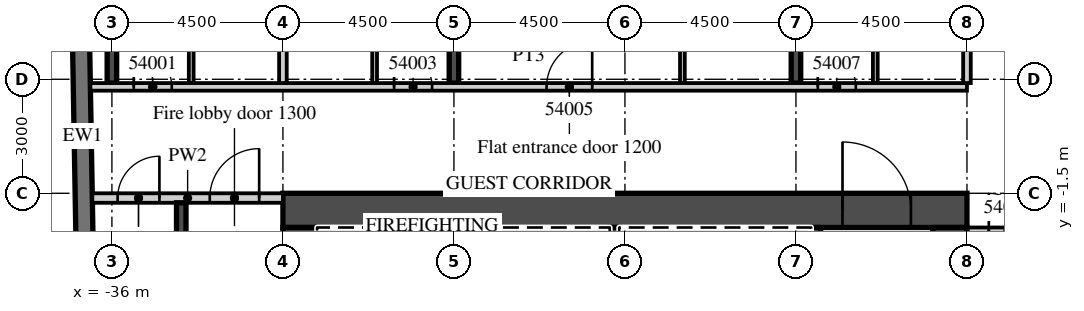
"""IFC4 building model, lengths in metres.
Left out: names, types, materials, properties, quantities, classifications, styles, units other than length and angle.
Written with IfcOpenShell. Run it as: python <this file> out.ifc"""

import sys

from ifc_helpers import new_model, si_unit, direction, frame, frame_2d, origin, place, context, subcontext, project, spatial, rectangle, extrude, element, fill, save


model = new_model("IFC4")
c1 = context("Model", 3, precision=1e-05, world=origin(), true_north=direction((0.0, 1.0)))
c2 = subcontext(c1, "Body", "Model", "MODEL_VIEW")
j1 = project(units=[si_unit("LENGTHUNIT", "METRE"), si_unit("PLANEANGLEUNIT", "RADIAN")], contexts=[c1])
p1 = place(None, origin())
s1 = spatial("IfcSite", under=j1, at=p1, CompositionType="ELEMENT")
p2 = place(p1, origin())
s2 = spatial("IfcBuilding", under=s1, at=p2, CompositionType="ELEMENT")
p3 = place(p2, frame((0.0, 0.0, 224.3)))
s3 = spatial("IfcBuildingStorey", under=s2, at=p3, CompositionType="ELEMENT", Elevation=224.3)
p4 = place(p3, frame((-36.0, 1.4, 0.0), z_axis=(0.0, 0.0, 1.0), x_axis=(0.0, 1.0, 0.0)))
e1 = element("IfcWall", 1, at=p4, inside=s3, PredefinedType="SHEAR", context=c2, shape_type="SweptSolid", body=[
    extrude(rectangle(XDim=17.125, YDim=0.25, at=frame_2d((8.563, 0.0))), origin(), (0.0, 0.0, 1.0), 3.3),
])
p5 = place(p3, frame((-27.0, 1.4, 0.0), z_axis=(0.0, 0.0, 1.0), x_axis=(0.0, 1.0, 0.0)))
e2 = element("IfcWall", 2, at=p5, inside=s3, PredefinedType="SHEAR", context=c2, shape_type="SweptSolid", body=[
    extrude(rectangle(XDim=18.817, YDim=0.25, at=frame_2d((9.409, 0.0))), origin(), (0.0, 0.0, 1.0), 3.3),
])
p6 = place(p3, frame((-18.0, 1.4, 0.0), z_axis=(0.0, 0.0, 1.0), x_axis=(0.0, 1.0, 0.0)))
e3 = element("IfcWall", 3, at=p6, inside=s3, PredefinedType="SHEAR", context=c2, shape_type="SweptSolid", body=[
    extrude(rectangle(XDim=18.974, YDim=0.25, at=frame_2d((9.487, 0.0))), origin(), (0.0, 0.0, 1.0), 3.3),
])
p7 = place(p3, frame((-37.057, 16.503, 0.0), z_axis=(0.0, 0.0, 1.0), x_axis=(0.017452279857, -0.999847697366, 0.0)))
e4 = element("IfcWall", 4, at=p7, inside=s3, PredefinedType="SOLIDWALL", context=c2, shape_type="SweptSolid", body=[
    extrude(rectangle(XDim=33.0, YDim=0.45, at=frame_2d((16.5, 0.0))), origin(), (0.0, 0.0, 1.0), 3.02),
])
p8 = place(p3, frame((-36.566, 1.3, 0.0), z_axis=(0.0, 0.0, 1.0), x_axis=(1.0, 0.0, 0.0)))
e5 = element("IfcWall", 5, at=p8, inside=s3, PredefinedType="PARTITIONING", context=c2, shape_type="SweptSolid", body=[
    extrude(rectangle(XDim=23.066, YDim=0.2, at=frame_2d((11.533, 0.0))), origin(), (0.0, 0.0, 1.0), 3.02),
])
p9 = place(p8, frame((1.141, 0.0, 0.0)))
e6 = element("IfcOpeningElement", 6, at=p9, cuts=e5, PredefinedType="OPENING", context=c2, shape_type="SweptSolid", body=[
    extrude(rectangle(XDim=1.0, YDim=2.1, at=frame_2d((0.5, 1.05))), frame((0.0, 0.11, 0.0), z_axis=(0.0, -1.0, 0.0), x_axis=(1.0, 0.0, 0.0)), (0.0, 0.0, 1.0), 0.22),
])
p10 = place(p8, frame((7.991, 0.0, 0.0)))
e7 = element("IfcOpeningElement", 7, at=p10, cuts=e5, PredefinedType="OPENING", context=c2, shape_type="SweptSolid", body=[
    extrude(rectangle(XDim=1.0, YDim=2.1, at=frame_2d((0.5, 1.05))), frame((0.0, 0.11, 0.0), z_axis=(0.0, -1.0, 0.0), x_axis=(1.0, 0.0, 0.0)), (0.0, 0.0, 1.0), 0.22),
])
p11 = place(p8, frame((12.004, 0.0, 0.0)))
e8 = element("IfcOpeningElement", 8, at=p11, cuts=e5, PredefinedType="OPENING", context=c2, shape_type="SweptSolid", body=[
    extrude(rectangle(XDim=1.2, YDim=2.1, at=frame_2d((0.6, 1.05))), frame((0.0, 0.11, 0.0), z_axis=(0.0, -1.0, 0.0), x_axis=(1.0, 0.0, 0.0)), (0.0, 0.0, 1.0), 0.22),
])
p12 = place(p8, frame((19.141, 0.0, 0.0)))
e9 = element("IfcOpeningElement", 9, at=p12, cuts=e5, PredefinedType="OPENING", context=c2, shape_type="SweptSolid", body=[
    extrude(rectangle(XDim=1.0, YDim=2.1, at=frame_2d((0.5, 1.05))), frame((0.0, 0.11, 0.0), z_axis=(0.0, -1.0, 0.0), x_axis=(1.0, 0.0, 0.0)), (0.0, 0.0, 1.0), 0.22),
])
p13 = place(p3, frame((-31.5, 1.4, 0.0), z_axis=(0.0, 0.0, 1.0), x_axis=(0.0, 1.0, 0.0)))
e10 = element("IfcWall", 10, at=p13, inside=s3, PredefinedType="PARTITIONING", context=c2, shape_type="SweptSolid", body=[
    extrude(rectangle(XDim=18.751, YDim=0.2, at=frame_2d((9.375, 0.0))), origin(), (0.0, 0.0, 1.0), 3.02),
])
p14 = place(p3, frame((-33.913, 1.4, 0.0), z_axis=(0.0, 0.0, 1.0), x_axis=(0.0, 1.0, 0.0)))
e11 = element("IfcWall", 11, at=p14, inside=s3, PredefinedType="PARTITIONING", context=c2, shape_type="SweptSolid", body=[
    extrude(rectangle(XDim=6.725, YDim=0.125, at=frame_2d((3.363, 0.0))), origin(), (0.0, 0.0, 1.0), 3.02),
])
p15 = place(p14, frame((2.45, 0.0, 0.0)))
e12 = element("IfcOpeningElement", 12, at=p15, cuts=e11, PredefinedType="OPENING", context=c2, shape_type="SweptSolid", body=[
    extrude(rectangle(XDim=0.9, YDim=2.1, at=frame_2d((0.45, 1.05))), frame((0.0, 0.073, 0.0), z_axis=(0.0, -1.0, 0.0), x_axis=(1.0, 0.0, 0.0)), (0.0, 0.0, 1.0), 0.145),
])
p16 = place(p3, frame((-29.087, 1.4, 0.0), z_axis=(0.0, 0.0, 1.0), x_axis=(0.0, 1.0, 0.0)))
e13 = element("IfcWall", 13, at=p16, inside=s3, PredefinedType="PARTITIONING", context=c2, shape_type="SweptSolid", body=[
    extrude(rectangle(XDim=6.725, YDim=0.125, at=frame_2d((3.363, 0.0))), origin(), (0.0, 0.0, 1.0), 3.02),
])
p17 = place(p16, frame((2.45, 0.0, 0.0)))
e14 = element("IfcOpeningElement", 14, at=p17, cuts=e13, PredefinedType="OPENING", context=c2, shape_type="SweptSolid", body=[
    extrude(rectangle(XDim=0.9, YDim=2.1, at=frame_2d((0.45, 1.05))), frame((0.0, 0.073, 0.0), z_axis=(0.0, -1.0, 0.0), x_axis=(1.0, 0.0, 0.0)), (0.0, 0.0, 1.0), 0.145),
])
p18 = place(p3, frame((-20.988, 1.4, 0.0), z_axis=(0.0, 0.0, 1.0), x_axis=(0.0, 1.0, 0.0)))
e15 = element("IfcWall", 15, at=p18, inside=s3, PredefinedType="PARTITIONING", context=c2, shape_type="SweptSolid", body=[
    extrude(rectangle(XDim=6.725, YDim=0.125, at=frame_2d((3.363, 0.0))), origin(), (0.0, 0.0, 1.0), 3.02),
])
p19 = place(p18, frame((2.45, 0.0, 0.0)))
e16 = element("IfcOpeningElement", 16, at=p19, cuts=e15, PredefinedType="OPENING", context=c2, shape_type="SweptSolid", body=[
    extrude(rectangle(XDim=0.9, YDim=2.1, at=frame_2d((0.45, 1.05))), frame((0.0, 0.073, 0.0), z_axis=(0.0, -1.0, 0.0), x_axis=(1.0, 0.0, 0.0)), (0.0, 0.0, 1.0), 0.145),
])
p20 = place(p3, frame((-13.5, 1.4, 0.0), z_axis=(0.0, 0.0, 1.0), x_axis=(0.0, 1.0, 0.0)))
e17 = element("IfcWall", 17, at=p20, inside=s3, PredefinedType="PARTITIONING", context=c2, shape_type="SweptSolid", body=[
    extrude(rectangle(XDim=19.065, YDim=0.2, at=frame_2d((9.533, 0.0))), origin(), (0.0, 0.0, 1.0), 3.02),
])
p21 = place(p3, frame((-15.912, 1.4, 0.0), z_axis=(0.0, 0.0, 1.0), x_axis=(0.0, 1.0, 0.0)))
e18 = element("IfcWall", 18, at=p21, inside=s3, PredefinedType="PARTITIONING", context=c2, shape_type="SweptSolid", body=[
    extrude(rectangle(XDim=6.725, YDim=0.125, at=frame_2d((3.363, 0.0))), origin(), (0.0, 0.0, 1.0), 3.02),
])
p22 = place(p21, frame((2.45, 0.0, 0.0)))
e19 = element("IfcOpeningElement", 19, at=p22, cuts=e18, PredefinedType="OPENING", context=c2, shape_type="SweptSolid", body=[
    extrude(rectangle(XDim=0.9, YDim=2.1, at=frame_2d((0.45, 1.05))), frame((0.0, 0.073, 0.0), z_axis=(0.0, -1.0, 0.0), x_axis=(1.0, 0.0, 0.0)), (0.0, 0.0, 1.0), 0.145),
])
p23 = place(p3, frame((-13.5, -2.5, 0.0), z_axis=(0.0, 0.0, 1.0), x_axis=(1.0, 0.0, 0.0)))
e20 = element("IfcWall", 20, at=p23, inside=s3, PredefinedType="PARTITIONING", context=c2, shape_type="SweptSolid", body=[
    extrude(rectangle(XDim=27.0, YDim=0.2, at=frame_2d((13.5, 0.0))), origin(), (0.0, 0.0, 1.0), 3.02),
])
p24 = place(p23, frame((0.575, 0.0, 0.0)))
e21 = element("IfcOpeningElement", 21, at=p24, cuts=e20, PredefinedType="OPENING", context=c2, shape_type="SweptSolid", body=[
    extrude(rectangle(XDim=1.0, YDim=2.1, at=frame_2d((0.5, 1.05))), frame((0.0, 0.11, 0.0), z_axis=(0.0, -1.0, 0.0), x_axis=(1.0, 0.0, 0.0)), (0.0, 0.0, 1.0), 0.22),
])
p25 = place(p23, frame((6.938, 0.0, 0.0)))
e22 = element("IfcOpeningElement", 22, at=p25, cuts=e20, PredefinedType="OPENING", context=c2, shape_type="SweptSolid", body=[
    extrude(rectangle(XDim=1.2, YDim=2.1, at=frame_2d((0.6, 1.05))), frame((0.0, 0.11, 0.0), z_axis=(0.0, -1.0, 0.0), x_axis=(1.0, 0.0, 0.0)), (0.0, 0.0, 1.0), 0.22),
])
p26 = place(p23, frame((15.938, 0.0, 0.0)))
e23 = element("IfcOpeningElement", 23, at=p26, cuts=e20, PredefinedType="OPENING", context=c2, shape_type="SweptSolid", body=[
    extrude(rectangle(XDim=1.2, YDim=2.1, at=frame_2d((0.6, 1.05))), frame((0.0, 0.11, 0.0), z_axis=(0.0, -1.0, 0.0), x_axis=(1.0, 0.0, 0.0)), (0.0, 0.0, 1.0), 0.22),
])
p27 = place(p23, frame((25.425, 0.0, 0.0)))
e24 = element("IfcOpeningElement", 24, at=p27, cuts=e20, PredefinedType="OPENING", context=c2, shape_type="SweptSolid", body=[
    extrude(rectangle(XDim=1.0, YDim=2.1, at=frame_2d((0.5, 1.05))), frame((0.0, 0.11, 0.0), z_axis=(0.0, -1.0, 0.0), x_axis=(1.0, 0.0, 0.0)), (0.0, 0.0, 1.0), 0.22),
])
p28 = place(p3, frame((-31.5, -1.95, 0.0), z_axis=(0.0, 0.0, 1.0), x_axis=(1.0, 0.0, 0.0)))
e25 = element("IfcWall", 25, at=p28, inside=s3, PredefinedType="SHEAR", context=c2, shape_type="SweptSolid", body=[
    extrude(rectangle(XDim=18.0, YDim=0.9, at=frame_2d((9.0, 0.0))), origin(), (0.0, 0.0, 1.0), 3.02),
])
p29 = place(p28, frame((14.725, 0.0, 0.0)))
e26 = element("IfcOpeningElement", 26, at=p29, cuts=e25, PredefinedType="OPENING", context=c2, shape_type="SweptSolid", body=[
    extrude(rectangle(XDim=1.8, YDim=2.1, at=frame_2d((0.9, 1.05))), frame((0.0, 0.46, 0.0), z_axis=(0.0, -1.0, 0.0), x_axis=(1.0, 0.0, 0.0)), (0.0, 0.0, 1.0), 0.92),
])
p30 = place(p3, frame((-31.05, -15.2, 0.0), z_axis=(0.0, 0.0, 1.0), x_axis=(0.0, 1.0, 0.0)))
e27 = element("IfcWall", 27, at=p30, inside=s3, PredefinedType="SHEAR", context=c2, shape_type="SweptSolid", body=[
    extrude(rectangle(XDim=12.8, YDim=0.9, at=frame_2d((6.4, 0.0))), origin(), (0.0, 0.0, 1.0), 3.02),
])
p31 = place(p30, frame((11.5, 0.0, 0.0)))
e28 = element("IfcOpeningElement", 28, at=p31, cuts=e27, PredefinedType="OPENING", context=c2, shape_type="SweptSolid", body=[
    extrude(rectangle(XDim=1.1, YDim=2.1, at=frame_2d((0.55, 1.05))), frame((0.0, 0.46, 0.0), z_axis=(0.0, -1.0, 0.0), x_axis=(1.0, 0.0, 0.0)), (0.0, 0.0, 1.0), 0.92),
])
p32 = place(p3, frame((-13.95, -14.6, 0.0), z_axis=(0.0, 0.0, 1.0), x_axis=(0.0, 1.0, 0.0)))
e29 = element("IfcWall", 29, at=p32, inside=s3, PredefinedType="SHEAR", context=c2, shape_type="SweptSolid", body=[
    extrude(rectangle(XDim=12.2, YDim=0.9, at=frame_2d((6.1, 0.0))), origin(), (0.0, 0.0, 1.0), 3.02),
])
p33 = place(p3, frame((-17.475, -5.55, 0.0), z_axis=(0.0, 0.0, 1.0), x_axis=(0.0, 1.0, 0.0)))
e30 = element("IfcWall", 30, at=p33, inside=s3, PredefinedType="SHEAR", context=c2, shape_type="SweptSolid", body=[
    extrude(rectangle(XDim=3.15, YDim=0.25, at=frame_2d((1.575, 0.0))), origin(), (0.0, 0.0, 1.0), 3.02),
])
for number, where, z_axis, x_axis in (
    (31, (-27.975, -5.3, 0.0), (0.0, 0.0, 1.0), (0.0, 1.0, 0.0)),
    (32, (-22.775, -5.3, 0.0), (0.0, 0.0, 1.0), (0.0, 1.0, 0.0)),
):
    element("IfcWall", number, at=place(p3, frame(where, z_axis=z_axis, x_axis=x_axis)), inside=s3, PredefinedType="SHEAR", context=c2, shape_type="SweptSolid", body=[
        extrude(rectangle(XDim=2.9, YDim=0.25, at=frame_2d((1.45, 0.0))), origin(), (0.0, 0.0, 1.0), 3.02),
    ])
p34 = place(p3, frame((-36.515, -1.625, 0.0), z_axis=(0.0, 0.0, 1.0), x_axis=(1.0, 0.0, 0.0)))
e33 = element("IfcWall", 33, at=p34, inside=s3, PredefinedType="PARTITIONING", context=c2, shape_type="SweptSolid", body=[
    extrude(rectangle(XDim=5.015, YDim=0.25, at=frame_2d((2.508, 0.0))), origin(), (0.0, 0.0, 1.0), 3.02),
])
p35 = place(p34, frame((3.09, 0.0, 0.0)))
e34 = element("IfcOpeningElement", 34, at=p35, cuts=e33, PredefinedType="OPENING", context=c2, shape_type="SweptSolid", body=[
    extrude(rectangle(XDim=1.3, YDim=2.1, at=frame_2d((0.65, 1.05))), frame((0.0, 0.135, 0.0), z_axis=(0.0, -1.0, 0.0), x_axis=(1.0, 0.0, 0.0)), (0.0, 0.0, 1.0), 0.27),
])
p36 = place(p34, frame((0.665, 0.0, 0.0)))
e35 = element("IfcOpeningElement", 35, at=p36, cuts=e33, PredefinedType="OPENING", context=c2, shape_type="SweptSolid", body=[
    extrude(rectangle(XDim=1.1, YDim=2.1, at=frame_2d((0.55, 1.05))), frame((0.0, 0.135, 0.0), z_axis=(0.0, -1.0, 0.0), x_axis=(1.0, 0.0, 0.0)), (0.0, 0.0, 1.0), 0.27),
])
p37 = place(p3, frame((-34.175, -10.1, 0.0), z_axis=(0.0, 0.0, 1.0), x_axis=(0.0, 1.0, 0.0)))
e36 = element("IfcWall", 36, at=p37, inside=s3, PredefinedType="SHEAR", context=c2, shape_type="SweptSolid", body=[
    extrude(rectangle(XDim=8.35, YDim=0.25, at=frame_2d((4.175, 0.0))), origin(), (0.0, 0.0, 1.0), 3.02),
])
p38 = place(p9, origin())
e37 = element("IfcDoor", 37, at=p38, inside=s3, OperationType="SINGLE_SWING_LEFT", PredefinedType="DOOR", context=c2, shape_type="SweptSolid", body=[
    extrude(rectangle(XDim=1.0, YDim=2.1, at=frame_2d((0.5, 1.05))), frame((0.0, 0.025, 0.0), z_axis=(0.0, -1.0, 0.0), x_axis=(1.0, 0.0, 0.0)), (0.0, 0.0, 1.0), 0.05),
])
fill(e6, e37)
p39 = place(p10, origin())
e38 = element("IfcDoor", 38, at=p39, inside=s3, OperationType="SINGLE_SWING_LEFT", PredefinedType="DOOR", context=c2, shape_type="SweptSolid", body=[
    extrude(rectangle(XDim=1.0, YDim=2.1, at=frame_2d((0.5, 1.05))), frame((0.0, 0.025, 0.0), z_axis=(0.0, -1.0, 0.0), x_axis=(1.0, 0.0, 0.0)), (0.0, 0.0, 1.0), 0.05),
])
fill(e7, e38)
p40 = place(p11, origin())
e39 = element("IfcDoor", 39, at=p40, inside=s3, OperationType="SINGLE_SWING_RIGHT", PredefinedType="DOOR", context=c2, shape_type="SweptSolid", body=[
    extrude(rectangle(XDim=1.2, YDim=2.1, at=frame_2d((0.6, 1.05))), frame((0.0, 0.025, 0.0), z_axis=(0.0, -1.0, 0.0), x_axis=(1.0, 0.0, 0.0)), (0.0, 0.0, 1.0), 0.05),
])
fill(e8, e39)
p41 = place(p12, origin())
e40 = element("IfcDoor", 40, at=p41, inside=s3, OperationType="SINGLE_SWING_LEFT", PredefinedType="DOOR", context=c2, shape_type="SweptSolid", body=[
    extrude(rectangle(XDim=1.0, YDim=2.1, at=frame_2d((0.5, 1.05))), frame((0.0, 0.025, 0.0), z_axis=(0.0, -1.0, 0.0), x_axis=(1.0, 0.0, 0.0)), (0.0, 0.0, 1.0), 0.05),
])
fill(e9, e40)
p42 = place(p24, origin())
e41 = element("IfcDoor", 41, at=p42, inside=s3, OperationType="SINGLE_SWING_LEFT", PredefinedType="DOOR", context=c2, shape_type="SweptSolid", body=[
    extrude(rectangle(XDim=1.0, YDim=2.1, at=frame_2d((0.5, 1.05))), frame((0.0, 0.025, 0.0), z_axis=(0.0, -1.0, 0.0), x_axis=(1.0, 0.0, 0.0)), (0.0, 0.0, 1.0), 0.05),
])
fill(e21, e41)
p43 = place(p29, origin())
e42 = element("IfcDoor", 42, at=p43, inside=s3, OperationType="DOUBLE_DOOR_DOUBLE_SWING", PredefinedType="DOOR", context=c2, shape_type="SweptSolid", body=[
    extrude(rectangle(XDim=1.8, YDim=2.1, at=frame_2d((0.9, 1.05))), frame((0.0, 0.025, 0.0), z_axis=(0.0, -1.0, 0.0), x_axis=(1.0, 0.0, 0.0)), (0.0, 0.0, 1.0), 0.05),
])
fill(e26, e42)
p44 = place(p35, origin())
e43 = element("IfcDoor", 43, at=p44, inside=s3, OperationType="SINGLE_SWING_RIGHT", PredefinedType="DOOR", context=c2, shape_type="SweptSolid", body=[
    extrude(rectangle(XDim=1.3, YDim=2.1, at=frame_2d((0.65, 1.05))), frame((0.0, 0.025, 0.0), z_axis=(0.0, -1.0, 0.0), x_axis=(1.0, 0.0, 0.0)), (0.0, 0.0, 1.0), 0.05),
])
fill(e34, e43)
p45 = place(p36, origin())
e44 = element("IfcDoor", 44, at=p45, inside=s3, OperationType="SINGLE_SWING_RIGHT", PredefinedType="DOOR", context=c2, shape_type="SweptSolid", body=[
    extrude(rectangle(XDim=1.1, YDim=2.1, at=frame_2d((0.55, 1.05))), frame((0.0, 0.025, 0.0), z_axis=(0.0, -1.0, 0.0), x_axis=(1.0, 0.0, 0.0)), (0.0, 0.0, 1.0), 0.05),
])
fill(e35, e44)
save(model, sys.argv[1])
